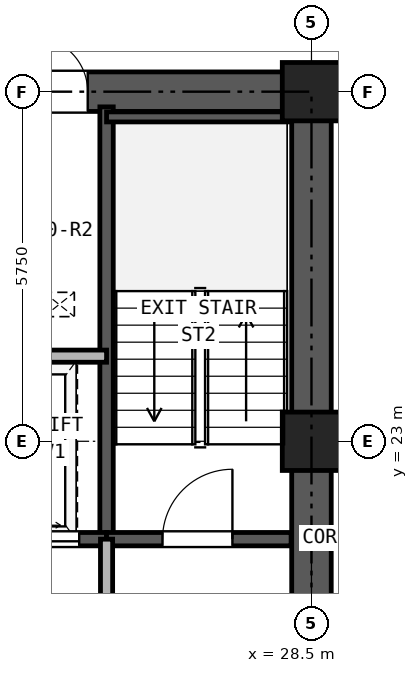
"""IFC4 building model, lengths in metres.
Left out: names, types, materials, properties, quantities, classifications, styles, units other than length and angle.
Written with IfcOpenShell. Run it as: python <this file> out.ifc"""

import sys

from ifc_helpers import new_model, si_unit, direction, frame, frame_2d, origin, origin_2d, place, context, subcontext, project, spatial, rectangle, hollow_rectangle, extrude, source, transform, mapped, element, fill, save


model = new_model("IFC4")
c1 = context("Model", 3, precision=1e-05, world=origin(), true_north=direction((0.0, 1.0)))
c2 = subcontext(c1, "Body", "Model", "MODEL_VIEW")
j1 = project(units=[si_unit("LENGTHUNIT", "METRE"), si_unit("PLANEANGLEUNIT", "RADIAN")], contexts=[c1])
p1 = place(None, origin())
s1 = spatial("IfcSite", under=j1, at=p1, CompositionType="ELEMENT")
p2 = place(p1, origin())
s2 = spatial("IfcBuilding", under=s1, at=p2, CompositionType="ELEMENT")
p3 = place(p2, frame((0.0, 0.0, 40.5)))
s3 = spatial("IfcBuildingStorey", under=s2, at=p3, CompositionType="ELEMENT", Elevation=40.5)
m1 = source(origin(), c2, "Body", "SweptSolid", [
    extrude(hollow_rectangle(XDim=0.96, YDim=0.96, WallThickness=0.06, at=origin_2d()), origin(), (0.0, 0.0, 1.0), 3.32),
])
for number, where, z_axis, x_axis in (
    (1, (28.5, 23.0, 0.0), (0.0, 0.0, 1.0), (1.0, 0.0, 0.0)),
    (2, (28.5, 28.75, 0.0), (0.0, 0.0, 1.0), (1.0, 0.0, 0.0)),
):
    element("IfcColumn", number, at=place(p3, frame(where, z_axis=z_axis, x_axis=x_axis)), inside=s3, PredefinedType="COLUMN", context=c2, shape_type="MappedRepresentation", body=[
        mapped(m1, transform((0.0, 0.0, 0.0), x_axis=(1.0, 0.0, 0.0), y_axis=(0.0, 1.0, 0.0), z_axis=(0.0, 0.0, 1.0), scale=1.0)),
    ])
p4 = place(p3, frame((18.175, 28.75, 0.0), z_axis=(0.0, 0.0, 1.0), x_axis=(1.0, 0.0, 0.0)))
e3 = element("IfcWall", 3, at=p4, inside=s3, PredefinedType="SHEAR", context=c2, shape_type="SweptSolid", body=[
    extrude(rectangle(XDim=10.65, YDim=0.65, at=frame_2d((5.325, 0.0))), origin(), (0.0, 0.0, 1.0), 3.32),
])
p5 = place(p4, frame((4.205, 0.0, 0.0)))
e4 = element("IfcOpeningElement", 4, at=p5, cuts=e3, PredefinedType="OPENING", context=c2, shape_type="SweptSolid", body=[
    extrude(rectangle(XDim=0.9, YDim=2.05, at=frame_2d((0.45, 1.025))), frame((0.0, 0.335, 0.0), z_axis=(0.0, -1.0, 0.0), x_axis=(1.0, 0.0, 0.0)), (0.0, 0.0, 1.0), 0.67),
])
p6 = place(p4, frame((5.745, 0.0, 0.0)))
e5 = element("IfcOpeningElement", 5, at=p6, cuts=e3, PredefinedType="OPENING", context=c2, shape_type="SweptSolid", body=[
    extrude(rectangle(XDim=0.9, YDim=2.05, at=frame_2d((0.45, 1.025))), frame((0.0, 0.335, 0.0), z_axis=(0.0, -1.0, 0.0), x_axis=(1.0, 0.0, 0.0)), (0.0, 0.0, 1.0), 0.67),
])
p7 = place(p3, frame((28.5, 11.825, 0.0), z_axis=(0.0, 0.0, 1.0), x_axis=(0.0, 1.0, 0.0)))
e6 = element("IfcWall", 6, at=p7, inside=s3, PredefinedType="SHEAR", context=c2, shape_type="SweptSolid", body=[
    extrude(rectangle(XDim=16.6, YDim=0.65, at=frame_2d((8.3, 0.0))), origin(), (0.0, 0.0, 1.0), 3.32),
])
p8 = place(p7, frame((7.325, 0.0, 0.0)))
e7 = element("IfcOpeningElement", 7, at=p8, cuts=e6, PredefinedType="OPENING", context=c2, shape_type="SweptSolid", body=[
    extrude(rectangle(XDim=1.15, YDim=2.2, at=frame_2d((0.575, 1.1))), frame((0.0, 0.335, 0.0), z_axis=(0.0, -1.0, 0.0), x_axis=(1.0, 0.0, 0.0)), (0.0, 0.0, 1.0), 0.67),
])
p9 = place(p3, frame((25.13, 21.39, 0.0), z_axis=(0.0, 0.0, 1.0), x_axis=(0.0, 1.0, 0.0)))
e8 = element("IfcWall", 8, at=p9, inside=s3, PredefinedType="SOLIDWALL", context=c2, shape_type="SweptSolid", body=[
    extrude(rectangle(XDim=7.11, YDim=0.22, at=frame_2d((3.555, 0.0))), origin(), (0.0, 0.0, 1.0), 3.32),
])
p10 = place(p3, frame((25.13, 28.335, 0.0), z_axis=(0.0, 0.0, 1.0), x_axis=(1.0, 0.0, 0.0)))
e9 = element("IfcWall", 9, at=p10, inside=s3, PredefinedType="PARTITIONING", context=c2, shape_type="SweptSolid", body=[
    extrude(rectangle(XDim=3.035, YDim=0.165, at=frame_2d((1.518, 0.0))), origin(), (0.0, 0.0, 1.0), 3.32),
])
p11 = place(p3, frame((18.835, 21.39, 0.0), z_axis=(0.0, 0.0, 1.0), x_axis=(1.0, 0.0, 0.0)))
e10 = element("IfcWall", 10, at=p11, inside=s3, PredefinedType="SOLIDWALL", context=c2, shape_type="SweptSolid", body=[
    extrude(rectangle(XDim=6.295, YDim=0.22, at=frame_2d((3.147, 0.0))), origin(), (0.0, 0.0, 1.0), 3.32),
])
p12 = place(p11, frame((1.015, 0.0, 0.0)))
e11 = element("IfcOpeningElement", 11, at=p12, cuts=e10, PredefinedType="OPENING", context=c2, shape_type="SweptSolid", body=[
    extrude(rectangle(XDim=1.15, YDim=2.2, at=frame_2d((0.575, 1.1))), frame((0.0, 0.12, 0.0), z_axis=(0.0, -1.0, 0.0), x_axis=(1.0, 0.0, 0.0)), (0.0, 0.0, 1.0), 0.24),
])
p13 = place(p11, frame((4.745, 0.0, 0.0)))
e12 = element("IfcOpeningElement", 12, at=p13, cuts=e10, PredefinedType="OPENING", context=c2, shape_type="SweptSolid", body=[
    extrude(rectangle(XDim=1.1, YDim=2.25, at=frame_2d((0.55, 1.125))), frame((0.0, 0.12, 0.0), z_axis=(0.0, -1.0, 0.0), x_axis=(1.0, 0.0, 0.0)), (0.0, 0.0, 1.0), 0.24),
])
p14 = place(p3, frame((25.13, 21.39, 0.0), z_axis=(0.0, 0.0, 1.0), x_axis=(1.0, 0.0, 0.0)))
e13 = element("IfcWall", 13, at=p14, inside=s3, PredefinedType="SOLIDWALL", context=c2, shape_type="SweptSolid", body=[
    extrude(rectangle(XDim=3.035, YDim=0.22, at=frame_2d((1.518, 0.0))), origin(), (0.0, 0.0, 1.0), 3.32),
])
p15 = place(p14, frame((0.92, 0.0, 0.0)))
e14 = element("IfcOpeningElement", 14, at=p15, cuts=e13, PredefinedType="OPENING", context=c2, shape_type="SweptSolid", body=[
    extrude(rectangle(XDim=1.15, YDim=2.2, at=frame_2d((0.575, 1.1))), frame((0.0, 0.12, 0.0), z_axis=(0.0, -1.0, 0.0), x_axis=(1.0, 0.0, 0.0)), (0.0, 0.0, 1.0), 0.24),
])
p16 = place(p3, frame((22.11, 24.4, 0.0), z_axis=(0.0, 0.0, 1.0), x_axis=(1.0, 0.0, 0.0)))
e15 = element("IfcWall", 15, at=p16, inside=s3, PredefinedType="PARTITIONING", context=c2, shape_type="SweptSolid", body=[
    extrude(rectangle(XDim=3.02, YDim=0.2, at=frame_2d((1.51, 0.0))), origin(), (0.0, 0.0, 1.0), 3.32),
])
p17 = place(p3, frame((25.13, 18.0, 0.0), z_axis=(0.0, 0.0, 1.0), x_axis=(0.0, 1.0, 0.0)))
e16 = element("IfcWall", 16, at=p17, inside=s3, PredefinedType="PARTITIONING", context=c2, shape_type="SweptSolid", body=[
    extrude(rectangle(XDim=3.39, YDim=0.2, at=frame_2d((1.695, 0.0))), origin(), (0.0, 0.0, 1.0), 3.32),
])
p18 = place(p17, frame((1.1, 0.0, 0.0)))
e17 = element("IfcOpeningElement", 17, at=p18, cuts=e16, PredefinedType="OPENING", context=c2, shape_type="SweptSolid", body=[
    extrude(rectangle(XDim=1.15, YDim=2.2, at=frame_2d((0.575, 1.1))), frame((0.0, 0.11, 0.0), z_axis=(0.0, -1.0, 0.0), x_axis=(1.0, 0.0, 0.0)), (0.0, 0.0, 1.0), 0.22),
])
p19 = place(p15, frame((1.15, 0.0, 0.0), z_axis=(0.0, 0.0, 1.0), x_axis=(-1.0, 0.0, 0.0)))
e18 = element("IfcDoor", 18, at=p19, inside=s3, OperationType="SINGLE_SWING_RIGHT", PredefinedType="DOOR", context=c2, shape_type="SweptSolid", body=[
    extrude(rectangle(XDim=1.15, YDim=2.2, at=frame_2d((0.575, 1.1))), frame((0.0, 0.025, 0.0), z_axis=(0.0, -1.0, 0.0), x_axis=(1.0, 0.0, 0.0)), (0.0, 0.0, 1.0), 0.05),
])
fill(e14, e18)
p20 = place(p13, frame((1.1, 0.0, 0.0), z_axis=(0.0, 0.0, 1.0), x_axis=(-1.0, 0.0, 0.0)))
e19 = element("IfcDoor", 19, at=p20, inside=s3, OperationType="DOUBLE_DOOR_SLIDING", PredefinedType="DOOR", context=c2, shape_type="SweptSolid", body=[
    extrude(rectangle(XDim=1.1, YDim=2.25, at=frame_2d((0.55, 1.125))), frame((0.0, 0.025, 0.0), z_axis=(0.0, -1.0, 0.0), x_axis=(1.0, 0.0, 0.0)), (0.0, 0.0, 1.0), 0.05),
])
fill(e12, e19)
p21 = place(p6, origin())
e20 = element("IfcDoor", 20, at=p21, inside=s3, OperationType="SINGLE_SWING_LEFT", PredefinedType="DOOR", context=c2, shape_type="SweptSolid", body=[
    extrude(rectangle(XDim=0.9, YDim=2.05, at=frame_2d((0.45, 1.025))), frame((0.0, 0.025, 0.0), z_axis=(0.0, -1.0, 0.0), x_axis=(1.0, 0.0, 0.0)), (0.0, 0.0, 1.0), 0.05),
])
fill(e5, e20)
save(model, sys.argv[1])
